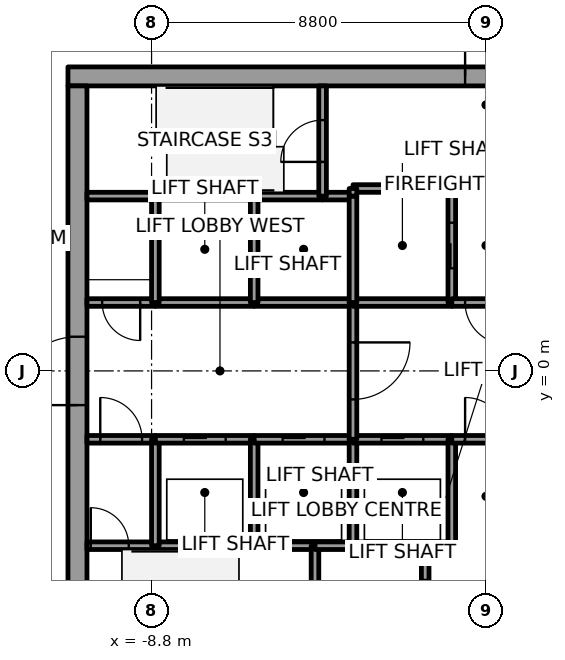
"""IFC4 building model, lengths in metres.
Left out: names, types, materials, properties, quantities, classifications, styles, units other than length and angle.
Written with IfcOpenShell. Run it as: python <this file> out.ifc"""

import sys

from ifc_helpers import new_model, si_unit, direction, frame, frame_2d, origin, place, context, subcontext, project, spatial, rectangle, extrude, element, fill, save


model = new_model("IFC4")
c1 = context("Model", 3, precision=1e-05, world=origin(), true_north=direction((0.0, 1.0)))
c2 = subcontext(c1, "Body", "Model", "MODEL_VIEW")
j1 = project(units=[si_unit("LENGTHUNIT", "METRE"), si_unit("PLANEANGLEUNIT", "RADIAN")], contexts=[c1])
p1 = place(None, origin())
s1 = spatial("IfcSite", under=j1, at=p1, CompositionType="ELEMENT")
p2 = place(p1, origin())
s2 = spatial("IfcBuilding", under=s1, at=p2, CompositionType="ELEMENT")
p3 = place(p2, frame((0.0, 0.0, 99.8)))
s3 = spatial("IfcBuildingStorey", under=s2, at=p3, CompositionType="ELEMENT", Elevation=99.8)
p4 = place(p3, frame((-11.0, 7.75, 0.0), z_axis=(0.0, 0.0, 1.0), x_axis=(1.0, 0.0, 0.0)))
e1 = element("IfcWall", 1, at=p4, inside=s3, PredefinedType="SHEAR", context=c2, shape_type="SweptSolid", body=[
    extrude(rectangle(XDim=22.0, YDim=0.5, at=frame_2d((11.0, 0.0))), origin(), (0.0, 0.0, 1.0), 3.7),
])
p5 = place(p4, frame((10.45, 0.0, 0.0)))
e2 = element("IfcOpeningElement", 2, at=p5, cuts=e1, PredefinedType="OPENING", context=c2, shape_type="SweptSolid", body=[
    extrude(rectangle(XDim=1.1, YDim=2.1, at=frame_2d((0.55, 1.05))), frame((0.0, 0.25, 0.0), z_axis=(0.0, -1.0, 0.0), x_axis=(1.0, 0.0, 0.0)), (0.0, 0.0, 1.0), 0.5),
])
p6 = place(p3, frame((-10.75, -7.5, 0.0), z_axis=(0.0, 0.0, 1.0), x_axis=(0.0, 1.0, 0.0)))
e3 = element("IfcWall", 3, at=p6, inside=s3, PredefinedType="SHEAR", context=c2, shape_type="SweptSolid", body=[
    extrude(rectangle(XDim=15.0, YDim=0.5, at=frame_2d((7.5, 0.0))), origin(), (0.0, 0.0, 1.0), 3.7),
])
p7 = place(p6, frame((6.6, 0.0, 0.0)))
e4 = element("IfcOpeningElement", 4, at=p7, cuts=e3, PredefinedType="OPENING", context=c2, shape_type="SweptSolid", body=[
    extrude(rectangle(XDim=1.8, YDim=2.1, at=frame_2d((0.9, 1.05))), frame((0.0, 0.25, 0.0), z_axis=(0.0, -1.0, 0.0), x_axis=(1.0, 0.0, 0.0)), (0.0, 0.0, 1.0), 0.5),
])
p8 = place(p3, frame((-10.5, -4.6, 0.0), z_axis=(0.0, 0.0, 1.0), x_axis=(1.0, 0.0, 0.0)))
e5 = element("IfcWall", 5, at=p8, inside=s3, PredefinedType="SOLIDWALL", context=c2, shape_type="SweptSolid", body=[
    extrude(rectangle(XDim=1.8, YDim=0.2, at=frame_2d((0.9, 0.0))), origin(), (0.0, 0.0, 1.0), 3.55),
])
p9 = place(p8, frame((0.1, 0.0, 0.0)))
e6 = element("IfcOpeningElement", 6, at=p9, cuts=e5, PredefinedType="OPENING", context=c2, shape_type="SweptSolid", body=[
    extrude(rectangle(XDim=1.0, YDim=2.1, at=frame_2d((0.5, 1.05))), frame((0.0, 0.1, 0.0), z_axis=(0.0, -1.0, 0.0), x_axis=(1.0, 0.0, 0.0)), (0.0, 0.0, 1.0), 0.2),
])
p10 = place(p3, frame((-10.5, -1.8, 0.0), z_axis=(0.0, 0.0, 1.0), x_axis=(1.0, 0.0, 0.0)))
e7 = element("IfcWall", 7, at=p10, inside=s3, PredefinedType="SOLIDWALL", context=c2, shape_type="SweptSolid", body=[
    extrude(rectangle(XDim=1.8, YDim=0.2, at=frame_2d((0.9, 0.0))), origin(), (0.0, 0.0, 1.0), 3.55),
])
p11 = place(p10, frame((0.35, 0.0, 0.0)))
e8 = element("IfcOpeningElement", 8, at=p11, cuts=e7, PredefinedType="OPENING", context=c2, shape_type="SweptSolid", body=[
    extrude(rectangle(XDim=1.1, YDim=2.1, at=frame_2d((0.55, 1.05))), frame((0.0, 0.1, 0.0), z_axis=(0.0, -1.0, 0.0), x_axis=(1.0, 0.0, 0.0)), (0.0, 0.0, 1.0), 0.2),
])
p12 = place(p3, frame((-8.7, 1.8, 0.0), z_axis=(0.0, 0.0, 1.0), x_axis=(-1.0, 0.0, 0.0)))
e9 = element("IfcWall", 9, at=p12, inside=s3, PredefinedType="SOLIDWALL", context=c2, shape_type="SweptSolid", body=[
    extrude(rectangle(XDim=1.8, YDim=0.2, at=frame_2d((0.9, 0.0))), origin(), (0.0, 0.0, 1.0), 3.55),
])
p13 = place(p12, frame((0.4, 0.0, 0.0)))
e10 = element("IfcOpeningElement", 10, at=p13, cuts=e9, PredefinedType="OPENING", context=c2, shape_type="SweptSolid", body=[
    extrude(rectangle(XDim=1.0, YDim=2.1, at=frame_2d((0.5, 1.05))), frame((0.0, 0.1, 0.0), z_axis=(0.0, -1.0, 0.0), x_axis=(1.0, 0.0, 0.0)), (0.0, 0.0, 1.0), 0.2),
])
p14 = place(p3, frame((-8.7, 4.6, 0.0), z_axis=(0.0, 0.0, 1.0), x_axis=(-1.0, 0.0, 0.0)))
e11 = element("IfcWall", 11, at=p14, inside=s3, PredefinedType="SOLIDWALL", context=c2, shape_type="SweptSolid", body=[
    extrude(rectangle(XDim=1.8, YDim=0.2, at=frame_2d((0.9, 0.0))), origin(), (0.0, 0.0, 1.0), 3.55),
])
p15 = place(p3, frame((-8.7, -4.6, 0.0), z_axis=(0.0, 0.0, 1.0), x_axis=(1.0, 0.0, 0.0)))
e12 = element("IfcWall", 12, at=p15, inside=s3, PredefinedType="SOLIDWALL", context=c2, shape_type="SweptSolid", body=[
    extrude(rectangle(XDim=2.6, YDim=0.2, at=frame_2d((1.3, 0.0))), origin(), (0.0, 0.0, 1.0), 3.55),
])
p16 = place(p3, frame((-8.7, -4.6, 0.0), z_axis=(0.0, 0.0, 1.0), x_axis=(0.0, 1.0, 0.0)))
e13 = element("IfcWall", 13, at=p16, inside=s3, PredefinedType="SOLIDWALL", context=c2, shape_type="SweptSolid", body=[
    extrude(rectangle(XDim=2.8, YDim=0.2, at=frame_2d((1.4, 0.0))), origin(), (0.0, 0.0, 1.0), 3.55),
])
p17 = place(p3, frame((-8.7, -1.8, 0.0), z_axis=(0.0, 0.0, 1.0), x_axis=(1.0, 0.0, 0.0)))
e14 = element("IfcWall", 14, at=p17, inside=s3, PredefinedType="SOLIDWALL", context=c2, shape_type="SweptSolid", body=[
    extrude(rectangle(XDim=2.6, YDim=0.2, at=frame_2d((1.3, 0.0))), origin(), (0.0, 0.0, 1.0), 3.55),
])
p18 = place(p17, frame((0.75, 0.0, 0.0)))
e15 = element("IfcOpeningElement", 15, at=p18, cuts=e14, PredefinedType="OPENING", context=c2, shape_type="SweptSolid", body=[
    extrude(rectangle(XDim=1.1, YDim=2.1, at=frame_2d((0.55, 1.05))), frame((0.0, 0.1, 0.0), z_axis=(0.0, -1.0, 0.0), x_axis=(1.0, 0.0, 0.0)), (0.0, 0.0, 1.0), 0.2),
])
p19 = place(p3, frame((-6.1, 1.8, 0.0), z_axis=(0.0, 0.0, 1.0), x_axis=(-1.0, 0.0, 0.0)))
e16 = element("IfcWall", 16, at=p19, inside=s3, PredefinedType="SOLIDWALL", context=c2, shape_type="SweptSolid", body=[
    extrude(rectangle(XDim=2.6, YDim=0.2, at=frame_2d((1.3, 0.0))), origin(), (0.0, 0.0, 1.0), 3.55),
])
p20 = place(p3, frame((-8.7, 1.8, 0.0), z_axis=(0.0, 0.0, 1.0), x_axis=(0.0, 1.0, 0.0)))
e17 = element("IfcWall", 17, at=p20, inside=s3, PredefinedType="SOLIDWALL", context=c2, shape_type="SweptSolid", body=[
    extrude(rectangle(XDim=2.8, YDim=0.2, at=frame_2d((1.4, 0.0))), origin(), (0.0, 0.0, 1.0), 3.55),
])
p21 = place(p3, frame((-6.1, 4.6, 0.0), z_axis=(0.0, 0.0, 1.0), x_axis=(-1.0, 0.0, 0.0)))
e18 = element("IfcWall", 18, at=p21, inside=s3, PredefinedType="SOLIDWALL", context=c2, shape_type="SweptSolid", body=[
    extrude(rectangle(XDim=2.6, YDim=0.2, at=frame_2d((1.3, 0.0))), origin(), (0.0, 0.0, 1.0), 3.55),
])
p22 = place(p3, frame((-6.1, -4.6, 0.0), z_axis=(0.0, 0.0, 1.0), x_axis=(1.0, 0.0, 0.0)))
e19 = element("IfcWall", 19, at=p22, inside=s3, PredefinedType="SOLIDWALL", context=c2, shape_type="SweptSolid", body=[
    extrude(rectangle(XDim=1.6, YDim=0.2, at=frame_2d((0.8, 0.0))), origin(), (0.0, 0.0, 1.0), 3.55),
])
p23 = place(p3, frame((-6.1, -4.6, 0.0), z_axis=(0.0, 0.0, 1.0), x_axis=(0.0, 1.0, 0.0)))
e20 = element("IfcWall", 20, at=p23, inside=s3, PredefinedType="SOLIDWALL", context=c2, shape_type="SweptSolid", body=[
    extrude(rectangle(XDim=2.8, YDim=0.2, at=frame_2d((1.4, 0.0))), origin(), (0.0, 0.0, 1.0), 3.55),
])
p24 = place(p3, frame((-6.1, -1.8, 0.0), z_axis=(0.0, 0.0, 1.0), x_axis=(1.0, 0.0, 0.0)))
e21 = element("IfcWall", 21, at=p24, inside=s3, PredefinedType="SOLIDWALL", context=c2, shape_type="SweptSolid", body=[
    extrude(rectangle(XDim=2.6, YDim=0.2, at=frame_2d((1.3, 0.0))), origin(), (0.0, 0.0, 1.0), 3.55),
])
p25 = place(p24, frame((0.75, 0.0, 0.0)))
e22 = element("IfcOpeningElement", 22, at=p25, cuts=e21, PredefinedType="OPENING", context=c2, shape_type="SweptSolid", body=[
    extrude(rectangle(XDim=1.1, YDim=2.1, at=frame_2d((0.55, 1.05))), frame((0.0, 0.1, 0.0), z_axis=(0.0, -1.0, 0.0), x_axis=(1.0, 0.0, 0.0)), (0.0, 0.0, 1.0), 0.2),
])
p26 = place(p3, frame((-3.5, 1.8, 0.0), z_axis=(0.0, 0.0, 1.0), x_axis=(-1.0, 0.0, 0.0)))
e23 = element("IfcWall", 23, at=p26, inside=s3, PredefinedType="SOLIDWALL", context=c2, shape_type="SweptSolid", body=[
    extrude(rectangle(XDim=2.6, YDim=0.2, at=frame_2d((1.3, 0.0))), origin(), (0.0, 0.0, 1.0), 3.55),
])
p27 = place(p3, frame((-6.1, 1.8, 0.0), z_axis=(0.0, 0.0, 1.0), x_axis=(0.0, 1.0, 0.0)))
e24 = element("IfcWall", 24, at=p27, inside=s3, PredefinedType="SOLIDWALL", context=c2, shape_type="SweptSolid", body=[
    extrude(rectangle(XDim=2.8, YDim=0.2, at=frame_2d((1.4, 0.0))), origin(), (0.0, 0.0, 1.0), 3.55),
])
p28 = place(p3, frame((-4.3, 4.6, 0.0), z_axis=(0.0, 0.0, 1.0), x_axis=(-1.0, 0.0, 0.0)))
e25 = element("IfcWall", 25, at=p28, inside=s3, PredefinedType="SOLIDWALL", context=c2, shape_type="SweptSolid", body=[
    extrude(rectangle(XDim=1.8, YDim=0.2, at=frame_2d((0.9, 0.0))), origin(), (0.0, 0.0, 1.0), 3.55),
])
p29 = place(p3, frame((-4.5, -4.6, 0.0), z_axis=(0.0, 0.0, 1.0), x_axis=(0.0, -1.0, 0.0)))
e26 = element("IfcWall", 26, at=p29, inside=s3, PredefinedType="SOLIDWALL", context=c2, shape_type="SweptSolid", body=[
    extrude(rectangle(XDim=2.9, YDim=0.2, at=frame_2d((1.45, 0.0))), origin(), (0.0, 0.0, 1.0), 3.55),
])
p30 = place(p3, frame((-4.5, -4.6, 0.0), z_axis=(0.0, 0.0, 1.0), x_axis=(1.0, 0.0, 0.0)))
e27 = element("IfcWall", 27, at=p30, inside=s3, PredefinedType="SOLIDWALL", context=c2, shape_type="SweptSolid", body=[
    extrude(rectangle(XDim=1.0, YDim=0.2, at=frame_2d((0.5, 0.0))), origin(), (0.0, 0.0, 1.0), 3.55),
])
p31 = place(p3, frame((-3.5, 4.6, 0.0), z_axis=(0.0, 0.0, 1.0), x_axis=(-1.0, 0.0, 0.0)))
e28 = element("IfcWall", 28, at=p31, inside=s3, PredefinedType="SOLIDWALL", context=c2, shape_type="SweptSolid", body=[
    extrude(rectangle(XDim=0.8, YDim=0.2, at=frame_2d((0.4, 0.0))), origin(), (0.0, 0.0, 1.0), 3.55),
])
p32 = place(p3, frame((-4.3, 4.6, 0.0), z_axis=(0.0, 0.0, 1.0), x_axis=(0.0, 1.0, 0.0)))
e29 = element("IfcWall", 29, at=p32, inside=s3, PredefinedType="SOLIDWALL", context=c2, shape_type="SweptSolid", body=[
    extrude(rectangle(XDim=2.9, YDim=0.2, at=frame_2d((1.45, 0.0))), origin(), (0.0, 0.0, 1.0), 3.55),
])
p33 = place(p32, frame((0.9, 0.0, 0.0)))
e30 = element("IfcOpeningElement", 30, at=p33, cuts=e29, PredefinedType="OPENING", context=c2, shape_type="SweptSolid", body=[
    extrude(rectangle(XDim=1.1, YDim=2.1, at=frame_2d((0.55, 1.05))), frame((0.0, 0.1, 0.0), z_axis=(0.0, -1.0, 0.0), x_axis=(1.0, 0.0, 0.0)), (0.0, 0.0, 1.0), 0.2),
])
p34 = place(p3, frame((-3.5, -4.6, 0.0), z_axis=(0.0, 0.0, 1.0), x_axis=(1.0, 0.0, 0.0)))
e31 = element("IfcWall", 31, at=p34, inside=s3, PredefinedType="SOLIDWALL", context=c2, shape_type="SweptSolid", body=[
    extrude(rectangle(XDim=1.9, YDim=0.2, at=frame_2d((0.95, 0.0))), origin(), (0.0, 0.0, 1.0), 3.55),
])
p35 = place(p3, frame((-3.5, -4.6, 0.0), z_axis=(0.0, 0.0, 1.0), x_axis=(0.0, 1.0, 0.0)))
e32 = element("IfcWall", 32, at=p35, inside=s3, PredefinedType="SOLIDWALL", context=c2, shape_type="SweptSolid", body=[
    extrude(rectangle(XDim=2.8, YDim=0.2, at=frame_2d((1.4, 0.0))), origin(), (0.0, 0.0, 1.0), 3.55),
])
p36 = place(p3, frame((-3.5, -1.8, 0.0), z_axis=(0.0, 0.0, 1.0), x_axis=(1.0, 0.0, 0.0)))
e33 = element("IfcWall", 33, at=p36, inside=s3, PredefinedType="SOLIDWALL", context=c2, shape_type="SweptSolid", body=[
    extrude(rectangle(XDim=2.6, YDim=0.2, at=frame_2d((1.3, 0.0))), origin(), (0.0, 0.0, 1.0), 3.55),
])
p37 = place(p36, frame((0.75, 0.0, 0.0)))
e34 = element("IfcOpeningElement", 34, at=p37, cuts=e33, PredefinedType="OPENING", context=c2, shape_type="SweptSolid", body=[
    extrude(rectangle(XDim=1.1, YDim=2.1, at=frame_2d((0.55, 1.05))), frame((0.0, 0.1, 0.0), z_axis=(0.0, -1.0, 0.0), x_axis=(1.0, 0.0, 0.0)), (0.0, 0.0, 1.0), 0.2),
])
p38 = place(p3, frame((-3.5, 1.8, 0.0), z_axis=(0.0, 0.0, 1.0), x_axis=(0.0, -1.0, 0.0)))
e35 = element("IfcWall", 35, at=p38, inside=s3, PredefinedType="SOLIDWALL", context=c2, shape_type="SweptSolid", body=[
    extrude(rectangle(XDim=3.6, YDim=0.2, at=frame_2d((1.8, 0.0))), origin(), (0.0, 0.0, 1.0), 3.55),
])
p39 = place(p38, frame((1.05, 0.0, 0.0)))
e36 = element("IfcOpeningElement", 36, at=p39, cuts=e35, PredefinedType="OPENING", context=c2, shape_type="SweptSolid", body=[
    extrude(rectangle(XDim=1.5, YDim=2.1, at=frame_2d((0.75, 1.05))), frame((0.0, 0.1, 0.0), z_axis=(0.0, -1.0, 0.0), x_axis=(1.0, 0.0, 0.0)), (0.0, 0.0, 1.0), 0.2),
])
p40 = place(p3, frame((-0.9, 1.8, 0.0), z_axis=(0.0, 0.0, 1.0), x_axis=(-1.0, 0.0, 0.0)))
e37 = element("IfcWall", 37, at=p40, inside=s3, PredefinedType="SOLIDWALL", context=c2, shape_type="SweptSolid", body=[
    extrude(rectangle(XDim=2.6, YDim=0.2, at=frame_2d((1.3, 0.0))), origin(), (0.0, 0.0, 1.0), 3.55),
])
p41 = place(p3, frame((-3.5, 4.6, 0.0), z_axis=(0.0, 0.0, 1.0), x_axis=(0.0, -1.0, 0.0)))
e38 = element("IfcWall", 38, at=p41, inside=s3, PredefinedType="SOLIDWALL", context=c2, shape_type="SweptSolid", body=[
    extrude(rectangle(XDim=2.8, YDim=0.2, at=frame_2d((1.4, 0.0))), origin(), (0.0, 0.0, 1.0), 3.55),
])
p42 = place(p3, frame((-0.9, 1.8, 0.0), z_axis=(0.0, 0.0, 1.0), x_axis=(0.0, 1.0, 0.0)))
e39 = element("IfcWall", 39, at=p42, inside=s3, PredefinedType="SOLIDWALL", context=c2, shape_type="SweptSolid", body=[
    extrude(rectangle(XDim=3.0, YDim=0.2, at=frame_2d((1.5, 0.0))), origin(), (0.0, 0.0, 1.0), 3.55),
])
p43 = place(p42, frame((0.9, 0.0, 0.0)))
e40 = element("IfcOpeningElement", 40, at=p43, cuts=e39, PredefinedType="OPENING", context=c2, shape_type="SweptSolid", body=[
    extrude(rectangle(XDim=1.2, YDim=2.1, at=frame_2d((0.6, 1.05))), frame((0.0, 0.1, 0.0), z_axis=(0.0, -1.0, 0.0), x_axis=(1.0, 0.0, 0.0)), (0.0, 0.0, 1.0), 0.2),
])
p44 = place(p3, frame((-0.9, 4.8, 0.0), z_axis=(0.0, 0.0, 1.0), x_axis=(-1.0, 0.0, 0.0)))
e41 = element("IfcWall", 41, at=p44, inside=s3, PredefinedType="SOLIDWALL", context=c2, shape_type="SweptSolid", body=[
    extrude(rectangle(XDim=2.6, YDim=0.2, at=frame_2d((1.3, 0.0))), origin(), (0.0, 0.0, 1.0), 3.55),
])
p45 = place(p3, frame((-3.5, 4.8, 0.0), z_axis=(0.0, 0.0, 1.0), x_axis=(0.0, -1.0, 0.0)))
e42 = element("IfcWall", 42, at=p45, inside=s3, PredefinedType="SOLIDWALL", context=c2, shape_type="SweptSolid", body=[
    extrude(rectangle(XDim=0.2, YDim=0.2, at=frame_2d((0.1, 0.0))), origin(), (0.0, 0.0, 1.0), 3.55),
])
p46 = place(p3, frame((-1.6, -7.5, 0.0), z_axis=(0.0, 0.0, 1.0), x_axis=(0.0, 1.0, 0.0)))
e43 = element("IfcWall", 43, at=p46, inside=s3, PredefinedType="SOLIDWALL", context=c2, shape_type="SweptSolid", body=[
    extrude(rectangle(XDim=2.9, YDim=0.2, at=frame_2d((1.45, 0.0))), origin(), (0.0, 0.0, 1.0), 3.55),
])
p47 = place(p46, frame((0.9, 0.0, 0.0)))
e44 = element("IfcOpeningElement", 44, at=p47, cuts=e43, PredefinedType="OPENING", context=c2, shape_type="SweptSolid", body=[
    extrude(rectangle(XDim=1.1, YDim=2.1, at=frame_2d((0.55, 1.05))), frame((0.0, 0.1, 0.0), z_axis=(0.0, -1.0, 0.0), x_axis=(1.0, 0.0, 0.0)), (0.0, 0.0, 1.0), 0.2),
])
p48 = place(p3, frame((-1.6, -4.6, 0.0), z_axis=(0.0, 0.0, 1.0), x_axis=(1.0, 0.0, 0.0)))
e45 = element("IfcWall", 45, at=p48, inside=s3, PredefinedType="SOLIDWALL", context=c2, shape_type="SweptSolid", body=[
    extrude(rectangle(XDim=0.7, YDim=0.2, at=frame_2d((0.35, 0.0))), origin(), (0.0, 0.0, 1.0), 3.55),
])
p49 = place(p3, frame((-0.9, -4.6, 0.0), z_axis=(0.0, 0.0, 1.0), x_axis=(0.0, 1.0, 0.0)))
e46 = element("IfcWall", 46, at=p49, inside=s3, PredefinedType="SOLIDWALL", context=c2, shape_type="SweptSolid", body=[
    extrude(rectangle(XDim=2.8, YDim=0.2, at=frame_2d((1.4, 0.0))), origin(), (0.0, 0.0, 1.0), 3.55),
])
p50 = place(p3, frame((-0.9, -1.8, 0.0), z_axis=(0.0, 0.0, 1.0), x_axis=(1.0, 0.0, 0.0)))
e47 = element("IfcWall", 47, at=p50, inside=s3, PredefinedType="SOLIDWALL", context=c2, shape_type="SweptSolid", body=[
    extrude(rectangle(XDim=1.8, YDim=0.2, at=frame_2d((0.9, 0.0))), origin(), (0.0, 0.0, 1.0), 3.55),
])
p51 = place(p50, frame((0.35, 0.0, 0.0)))
e48 = element("IfcOpeningElement", 48, at=p51, cuts=e47, PredefinedType="OPENING", context=c2, shape_type="SweptSolid", body=[
    extrude(rectangle(XDim=1.1, YDim=2.1, at=frame_2d((0.55, 1.05))), frame((0.0, 0.1, 0.0), z_axis=(0.0, -1.0, 0.0), x_axis=(1.0, 0.0, 0.0)), (0.0, 0.0, 1.0), 0.2),
])
p52 = place(p3, frame((0.9, 1.8, 0.0), z_axis=(0.0, 0.0, 1.0), x_axis=(-1.0, 0.0, 0.0)))
e49 = element("IfcWall", 49, at=p52, inside=s3, PredefinedType="SOLIDWALL", context=c2, shape_type="SweptSolid", body=[
    extrude(rectangle(XDim=1.8, YDim=0.2, at=frame_2d((0.9, 0.0))), origin(), (0.0, 0.0, 1.0), 3.55),
])
p53 = place(p52, frame((0.35, 0.0, 0.0)))
e50 = element("IfcOpeningElement", 50, at=p53, cuts=e49, PredefinedType="OPENING", context=c2, shape_type="SweptSolid", body=[
    extrude(rectangle(XDim=1.1, YDim=2.1, at=frame_2d((0.55, 1.05))), frame((0.0, 0.1, 0.0), z_axis=(0.0, -1.0, 0.0), x_axis=(1.0, 0.0, 0.0)), (0.0, 0.0, 1.0), 0.2),
])
p54 = place(p18, origin())
e51 = element("IfcDoor", 51, at=p54, inside=s3, OperationType="SLIDING_TO_RIGHT", PredefinedType="DOOR", context=c2, shape_type="SweptSolid", body=[
    extrude(rectangle(XDim=1.1, YDim=2.1, at=frame_2d((0.55, 1.05))), frame((0.0, 0.025, 0.0), z_axis=(0.0, -1.0, 0.0), x_axis=(1.0, 0.0, 0.0)), (0.0, 0.0, 1.0), 0.05),
])
fill(e15, e51)
p55 = place(p25, origin())
e52 = element("IfcDoor", 52, at=p55, inside=s3, OperationType="SLIDING_TO_LEFT", PredefinedType="DOOR", context=c2, shape_type="SweptSolid", body=[
    extrude(rectangle(XDim=1.1, YDim=2.1, at=frame_2d((0.55, 1.05))), frame((0.0, 0.025, 0.0), z_axis=(0.0, -1.0, 0.0), x_axis=(1.0, 0.0, 0.0)), (0.0, 0.0, 1.0), 0.05),
])
fill(e22, e52)
p56 = place(p37, origin())
e53 = element("IfcDoor", 53, at=p56, inside=s3, OperationType="SLIDING_TO_LEFT", PredefinedType="DOOR", context=c2, shape_type="SweptSolid", body=[
    extrude(rectangle(XDim=1.1, YDim=2.1, at=frame_2d((0.55, 1.05))), frame((0.0, 0.025, 0.0), z_axis=(0.0, -1.0, 0.0), x_axis=(1.0, 0.0, 0.0)), (0.0, 0.0, 1.0), 0.05),
])
fill(e34, e53)
p57 = place(p43, origin())
e54 = element("IfcDoor", 54, at=p57, inside=s3, OperationType="SLIDING_TO_RIGHT", PredefinedType="DOOR", context=c2, shape_type="SweptSolid", body=[
    extrude(rectangle(XDim=1.2, YDim=2.1, at=frame_2d((0.6, 1.05))), frame((0.0, 0.025, 0.0), z_axis=(0.0, -1.0, 0.0), x_axis=(1.0, 0.0, 0.0)), (0.0, 0.0, 1.0), 0.05),
])
fill(e40, e54)
p58 = place(p39, origin())
e55 = element("IfcDoor", 55, at=p58, inside=s3, OperationType="DOUBLE_DOOR_SINGLE_SWING", PredefinedType="DOOR", context=c2, shape_type="SweptSolid", body=[
    extrude(rectangle(XDim=1.5, YDim=2.1, at=frame_2d((0.75, 1.05))), frame((0.0, 0.025, 0.0), z_axis=(0.0, -1.0, 0.0), x_axis=(1.0, 0.0, 0.0)), (0.0, 0.0, 1.0), 0.05),
])
fill(e36, e55)
p59 = place(p11, origin())
e56 = element("IfcDoor", 56, at=p59, inside=s3, OperationType="SINGLE_SWING_LEFT", PredefinedType="DOOR", context=c2, shape_type="SweptSolid", body=[
    extrude(rectangle(XDim=1.1, YDim=2.1, at=frame_2d((0.55, 1.05))), frame((0.0, 0.025, 0.0), z_axis=(0.0, -1.0, 0.0), x_axis=(1.0, 0.0, 0.0)), (0.0, 0.0, 1.0), 0.05),
])
fill(e8, e56)
p60 = place(p53, origin())
e57 = element("IfcDoor", 57, at=p60, inside=s3, OperationType="SINGLE_SWING_RIGHT", PredefinedType="DOOR", context=c2, shape_type="SweptSolid", body=[
    extrude(rectangle(XDim=1.1, YDim=2.1, at=frame_2d((0.55, 1.05))), frame((0.0, 0.025, 0.0), z_axis=(0.0, -1.0, 0.0), x_axis=(1.0, 0.0, 0.0)), (0.0, 0.0, 1.0), 0.05),
])
fill(e50, e57)
p61 = place(p51, origin())
e58 = element("IfcDoor", 58, at=p61, inside=s3, OperationType="SINGLE_SWING_LEFT", PredefinedType="DOOR", context=c2, shape_type="SweptSolid", body=[
    extrude(rectangle(XDim=1.1, YDim=2.1, at=frame_2d((0.55, 1.05))), frame((0.0, 0.025, 0.0), z_axis=(0.0, -1.0, 0.0), x_axis=(1.0, 0.0, 0.0)), (0.0, 0.0, 1.0), 0.05),
])
fill(e48, e58)
p62 = place(p13, origin())
e59 = element("IfcDoor", 59, at=p62, inside=s3, OperationType="SINGLE_SWING_RIGHT", PredefinedType="DOOR", context=c2, shape_type="SweptSolid", body=[
    extrude(rectangle(XDim=1.0, YDim=2.1, at=frame_2d((0.5, 1.05))), frame((0.0, 0.025, 0.0), z_axis=(0.0, -1.0, 0.0), x_axis=(1.0, 0.0, 0.0)), (0.0, 0.0, 1.0), 0.05),
])
fill(e10, e59)
p63 = place(p9, origin())
e60 = element("IfcDoor", 60, at=p63, inside=s3, OperationType="SINGLE_SWING_LEFT", PredefinedType="DOOR", context=c2, shape_type="SweptSolid", body=[
    extrude(rectangle(XDim=1.0, YDim=2.1, at=frame_2d((0.5, 1.05))), frame((0.0, 0.025, 0.0), z_axis=(0.0, -1.0, 0.0), x_axis=(1.0, 0.0, 0.0)), (0.0, 0.0, 1.0), 0.05),
])
fill(e6, e60)
p64 = place(p33, origin())
e61 = element("IfcDoor", 61, at=p64, inside=s3, OperationType="SINGLE_SWING_RIGHT", PredefinedType="DOOR", context=c2, shape_type="SweptSolid", body=[
    extrude(rectangle(XDim=1.1, YDim=2.1, at=frame_2d((0.55, 1.05))), frame((0.0, 0.025, 0.0), z_axis=(0.0, -1.0, 0.0), x_axis=(1.0, 0.0, 0.0)), (0.0, 0.0, 1.0), 0.05),
])
fill(e30, e61)
p65 = place(p7, origin())
e62 = element("IfcDoor", 62, at=p65, inside=s3, OperationType="DOUBLE_DOOR_SINGLE_SWING", PredefinedType="DOOR", context=c2, shape_type="SweptSolid", body=[
    extrude(rectangle(XDim=1.8, YDim=2.1, at=frame_2d((0.9, 1.05))), frame((0.0, 0.025, 0.0), z_axis=(0.0, -1.0, 0.0), x_axis=(1.0, 0.0, 0.0)), (0.0, 0.0, 1.0), 0.05),
])
fill(e4, e62)
p66 = place(p5, origin())
e63 = element("IfcDoor", 63, at=p66, inside=s3, OperationType="SINGLE_SWING_LEFT", PredefinedType="DOOR", context=c2, shape_type="SweptSolid", body=[
    extrude(rectangle(XDim=1.1, YDim=2.1, at=frame_2d((0.55, 1.05))), frame((0.0, 0.025, 0.0), z_axis=(0.0, -1.0, 0.0), x_axis=(1.0, 0.0, 0.0)), (0.0, 0.0, 1.0), 0.05),
])
fill(e2, e63)
save(model, sys.argv[1])
